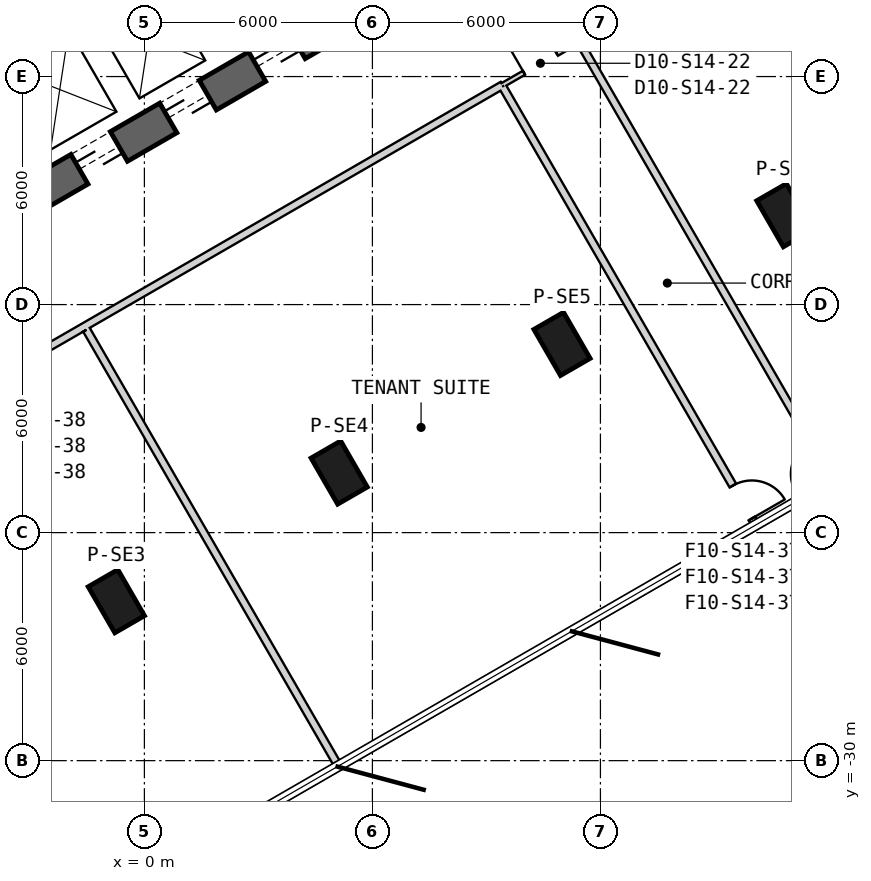
"""IFC4 building model, lengths in metres.
Left out: names, types, materials, properties, quantities, classifications, styles, units other than length and angle.
Written with IfcOpenShell. Run it as: python <this file> out.ifc"""

import sys

from ifc_helpers import new_model, si_unit, direction, frame, frame_2d, origin, origin_2d, place, context, subcontext, project, spatial, rectangle, extrude, element, fill, save


model = new_model("IFC4")
c1 = context("Model", 3, precision=1e-05, world=origin(), true_north=direction((0.0, 1.0)))
c2 = subcontext(c1, "Body", "Model", "MODEL_VIEW")
j1 = project(units=[si_unit("LENGTHUNIT", "METRE"), si_unit("PLANEANGLEUNIT", "RADIAN")], contexts=[c1])
p1 = place(None, origin())
s1 = spatial("IfcSite", under=j1, at=p1, CompositionType="ELEMENT")
p2 = place(p1, origin())
s2 = spatial("IfcBuilding", under=s1, at=p2, CompositionType="ELEMENT")
p3 = place(p2, frame((0.0, 0.0, 229.2)))
s3 = spatial("IfcBuildingStorey", under=s2, at=p3, CompositionType="ELEMENT", Elevation=229.2)
for number, where, z_axis, x_axis in (
    (1, (-0.738, -25.805, 0.0), (0.0, 0.0, 1.0), (0.5, -0.866, 0.0)),
    (2, (5.126, -22.42, 0.0), (0.0, 0.0, 1.0), (0.5, -0.866, 0.0)),
    (3, (10.99, -19.035, 0.0), (0.0, 0.0, 1.0), (0.5, -0.866, 0.0)),
    (4, (16.854, -15.649, 0.0), (0.0, 0.0, 1.0), (0.5, -0.866, 0.0)),
):
    element("IfcColumn", number, at=place(p3, frame(where, z_axis=z_axis, x_axis=x_axis)), inside=s3, PredefinedType="COLUMN", context=c2, shape_type="SweptSolid", body=[
        extrude(rectangle(XDim=1.4, YDim=0.9, at=origin_2d()), origin(), (0.0, 0.0, 1.0), 4.0),
    ])
p4 = place(p3, frame((-7.825, -17.97, 0.0), z_axis=(0.0, 0.0, 1.0), x_axis=(0.866028369851, 0.499994862586, 0.0)))
e5 = element("IfcWall", 5, at=p4, inside=s3, PredefinedType="SHEAR", context=c2, shape_type="SweptSolid", body=[
    extrude(rectangle(XDim=31.523, YDim=0.9, at=frame_2d((15.762, 0.0))), origin(), (0.0, 0.0, 1.0), 4.0),
])
p5 = place(p4, frame((7.062, 0.0, 0.0)))
e6 = element("IfcOpeningElement", 6, at=p5, cuts=e5, PredefinedType="OPENING", context=c2, shape_type="SweptSolid", body=[
    extrude(rectangle(XDim=1.2, YDim=2.4, at=frame_2d((0.6, 1.2))), frame((0.0, 0.46, 0.0), z_axis=(0.0, -1.0, 0.0), x_axis=(1.0, 0.0, 0.0)), (0.0, 0.0, 1.0), 0.92),
])
p6 = place(p4, frame((9.762, 0.0, 0.0)))
e7 = element("IfcOpeningElement", 7, at=p6, cuts=e5, PredefinedType="OPENING", context=c2, shape_type="SweptSolid", body=[
    extrude(rectangle(XDim=1.2, YDim=2.4, at=frame_2d((0.6, 1.2))), frame((0.0, 0.46, 0.0), z_axis=(0.0, -1.0, 0.0), x_axis=(1.0, 0.0, 0.0)), (0.0, 0.0, 1.0), 0.92),
])
p7 = place(p4, frame((12.462, 0.0, 0.0)))
e8 = element("IfcOpeningElement", 8, at=p7, cuts=e5, PredefinedType="OPENING", context=c2, shape_type="SweptSolid", body=[
    extrude(rectangle(XDim=1.2, YDim=2.4, at=frame_2d((0.6, 1.2))), frame((0.0, 0.46, 0.0), z_axis=(0.0, -1.0, 0.0), x_axis=(1.0, 0.0, 0.0)), (0.0, 0.0, 1.0), 0.92),
])
p8 = place(p4, frame((15.162, 0.0, 0.0)))
e9 = element("IfcOpeningElement", 9, at=p8, cuts=e5, PredefinedType="OPENING", context=c2, shape_type="SweptSolid", body=[
    extrude(rectangle(XDim=1.2, YDim=2.4, at=frame_2d((0.6, 1.2))), frame((0.0, 0.46, 0.0), z_axis=(0.0, -1.0, 0.0), x_axis=(1.0, 0.0, 0.0)), (0.0, 0.0, 1.0), 0.92),
])
p9 = place(p4, frame((17.862, 0.0, 0.0)))
e10 = element("IfcOpeningElement", 10, at=p9, cuts=e5, PredefinedType="OPENING", context=c2, shape_type="SweptSolid", body=[
    extrude(rectangle(XDim=1.2, YDim=2.4, at=frame_2d((0.6, 1.2))), frame((0.0, 0.46, 0.0), z_axis=(0.0, -1.0, 0.0), x_axis=(1.0, 0.0, 0.0)), (0.0, 0.0, 1.0), 0.92),
])
p10 = place(p4, frame((20.562, 0.0, 0.0)))
e11 = element("IfcOpeningElement", 11, at=p10, cuts=e5, PredefinedType="OPENING", context=c2, shape_type="SweptSolid", body=[
    extrude(rectangle(XDim=1.2, YDim=2.4, at=frame_2d((0.6, 1.2))), frame((0.0, 0.46, 0.0), z_axis=(0.0, -1.0, 0.0), x_axis=(1.0, 0.0, 0.0)), (0.0, 0.0, 1.0), 0.92),
])
p11 = place(p4, frame((26.712, 0.0, 0.0)))
e12 = element("IfcOpeningElement", 12, at=p11, cuts=e5, PredefinedType="OPENING", context=c2, shape_type="SweptSolid", body=[
    extrude(rectangle(XDim=1.2, YDim=2.4, at=frame_2d((0.6, 1.2))), frame((0.0, 0.46, 0.0), z_axis=(0.0, -1.0, 0.0), x_axis=(1.0, 0.0, 0.0)), (0.0, 0.0, 1.0), 0.92),
])
p12 = place(p4, frame((3.612, 0.0, 0.0)))
e13 = element("IfcOpeningElement", 13, at=p12, cuts=e5, PredefinedType="OPENING", context=c2, shape_type="SweptSolid", body=[
    extrude(rectangle(XDim=1.2, YDim=2.4, at=frame_2d((0.6, 1.2))), frame((0.0, 0.46, 0.0), z_axis=(0.0, -1.0, 0.0), x_axis=(1.0, 0.0, 0.0)), (0.0, 0.0, 1.0), 0.92),
])
p13 = place(p3, frame((-1.769, -10.237, 0.0), z_axis=(0.0, 0.0, 1.0), x_axis=(-0.871534483978, -0.490334215854, 0.0)))
e14 = element("IfcWall", 14, at=p13, inside=s3, PredefinedType="PLUMBINGWALL", context=c2, shape_type="SweptSolid", body=[
    extrude(rectangle(XDim=2.7, YDim=0.2, at=frame_2d((1.35, 0.0))), origin(), (0.0, 0.0, 1.0), 3.7),
])
p14 = place(p3, frame((9.425, -12.225, 0.0), z_axis=(0.0, 0.0, 1.0), x_axis=(0.866053019151, 0.499952165731, 0.0)))
e15 = element("IfcWall", 15, at=p14, inside=s3, PredefinedType="PARTITIONING", context=c2, shape_type="SweptSolid", body=[
    extrude(rectangle(XDim=2.3, YDim=0.12, at=frame_2d((1.15, 0.0))), origin(), (0.0, 0.0, 1.0), 3.7),
])
p15 = place(p14, frame((0.65, 0.0, 0.0)))
e16 = element("IfcOpeningElement", 16, at=p15, cuts=e15, PredefinedType="OPENING", context=c2, shape_type="SweptSolid", body=[
    extrude(rectangle(XDim=1.0, YDim=2.1, at=frame_2d((0.5, 1.05))), frame((0.0, 0.07, 0.0), z_axis=(0.0, -1.0, 0.0), x_axis=(1.0, 0.0, 0.0)), (0.0, 0.0, 1.0), 0.14),
])
p16 = place(p3, frame((-6.644, -21.503, 0.0), z_axis=(0.0, 0.0, 1.0), x_axis=(0.866020815794, 0.500007946548, 0.0)))
e17 = element("IfcWall", 17, at=p16, inside=s3, PredefinedType="PARTITIONING", context=c2, shape_type="SweptSolid", body=[
    extrude(rectangle(XDim=18.555, YDim=0.2, at=frame_2d((9.278, 0.0))), origin(), (0.0, 0.0, 1.0), 2.88),
])
p17 = place(p16, frame((2.477, 0.0, 0.0)))
e18 = element("IfcOpeningElement", 18, at=p17, cuts=e17, PredefinedType="OPENING", context=c2, shape_type="SweptSolid", body=[
    extrude(rectangle(XDim=1.0, YDim=2.1, at=frame_2d((0.5, 1.05))), frame((0.0, 0.11, 0.0), z_axis=(0.0, -1.0, 0.0), x_axis=(1.0, 0.0, 0.0)), (0.0, 0.0, 1.0), 0.22),
])
p18 = place(p3, frame((18.112, -22.631, 0.0), z_axis=(0.0, 0.0, 1.0), x_axis=(-0.499988448798, 0.866032072771, 0.0)))
e19 = element("IfcWall", 19, at=p18, inside=s3, PredefinedType="PARTITIONING", context=c2, shape_type="SweptSolid", body=[
    extrude(rectangle(XDim=13.295, YDim=0.2, at=frame_2d((6.647, 0.0))), origin(), (0.0, 0.0, 1.0), 3.7),
])
p19 = place(p18, frame((0.2, 0.0, 0.0)))
e20 = element("IfcOpeningElement", 20, at=p19, cuts=e19, PredefinedType="OPENING", context=c2, shape_type="SweptSolid", body=[
    extrude(rectangle(XDim=1.0, YDim=2.1, at=frame_2d((0.5, 1.05))), frame((0.0, 0.11, 0.0), z_axis=(0.0, -1.0, 0.0), x_axis=(1.0, 0.0, 0.0)), (0.0, 0.0, 1.0), 0.22),
])
p20 = place(p3, frame((9.438, -12.287, 0.0), z_axis=(0.0, 0.0, 1.0), x_axis=(0.499994270035, -0.866028711956, 0.0)))
e21 = element("IfcWall", 21, at=p20, inside=s3, PredefinedType="PARTITIONING", context=c2, shape_type="SweptSolid", body=[
    extrude(rectangle(XDim=13.295, YDim=0.2, at=frame_2d((6.647, 0.0))), origin(), (0.0, 0.0, 1.0), 3.7),
])
p21 = place(p20, frame((12.095, 0.0, 0.0)))
e22 = element("IfcOpeningElement", 22, at=p21, cuts=e21, PredefinedType="OPENING", context=c2, shape_type="SweptSolid", body=[
    extrude(rectangle(XDim=1.0, YDim=2.1, at=frame_2d((0.5, 1.05))), frame((0.0, 0.11, 0.0), z_axis=(0.0, -1.0, 0.0), x_axis=(1.0, 0.0, 0.0)), (0.0, 0.0, 1.0), 0.22),
])
p22 = place(p3, frame((5.104, -30.142, 0.0), z_axis=(0.0, 0.0, 1.0), x_axis=(-0.500068930226, 0.865985603242, 0.0)))
e23 = element("IfcWall", 23, at=p22, inside=s3, PredefinedType="PARTITIONING", context=c2, shape_type="SweptSolid", body=[
    extrude(rectangle(XDim=13.256, YDim=0.2, at=frame_2d((6.628, 0.0))), origin(), (0.0, 0.0, 1.0), 2.98),
])
p23 = place(p15, origin())
e24 = element("IfcDoor", 24, at=p23, inside=s3, OperationType="SINGLE_SWING_RIGHT", PredefinedType="NOTDEFINED", context=c2, shape_type="SweptSolid", body=[
    extrude(rectangle(XDim=1.0, YDim=2.1, at=frame_2d((0.5, 1.05))), frame((0.0, 0.025, 0.0), z_axis=(0.0, -1.0, 0.0), x_axis=(1.0, 0.0, 0.0)), (0.0, 0.0, 1.0), 0.05),
])
fill(e16, e24)
p24 = place(p21, origin())
e25 = element("IfcDoor", 25, at=p24, inside=s3, OperationType="SINGLE_SWING_LEFT", PredefinedType="USERDEFINED", context=c2, shape_type="SweptSolid", body=[
    extrude(rectangle(XDim=1.0, YDim=2.1, at=frame_2d((0.5, 1.05))), frame((0.0, 0.025, 0.0), z_axis=(0.0, -1.0, 0.0), x_axis=(1.0, 0.0, 0.0)), (0.0, 0.0, 1.0), 0.05),
])
fill(e22, e25)
p25 = place(p5, origin())
e26 = element("IfcDoor", 26, at=p25, inside=s3, OperationType="SLIDING_TO_LEFT", PredefinedType="USERDEFINED", context=c2, shape_type="SweptSolid", body=[
    extrude(rectangle(XDim=1.2, YDim=2.4, at=frame_2d((0.6, 1.2))), frame((0.0, 0.025, 0.0), z_axis=(0.0, -1.0, 0.0), x_axis=(1.0, 0.0, 0.0)), (0.0, 0.0, 1.0), 0.05),
])
fill(e6, e26)
p26 = place(p6, origin())
e27 = element("IfcDoor", 27, at=p26, inside=s3, OperationType="SLIDING_TO_LEFT", PredefinedType="USERDEFINED", context=c2, shape_type="SweptSolid", body=[
    extrude(rectangle(XDim=1.2, YDim=2.4, at=frame_2d((0.6, 1.2))), frame((0.0, 0.025, 0.0), z_axis=(0.0, -1.0, 0.0), x_axis=(1.0, 0.0, 0.0)), (0.0, 0.0, 1.0), 0.05),
])
fill(e7, e27)
p27 = place(p7, origin())
e28 = element("IfcDoor", 28, at=p27, inside=s3, OperationType="SLIDING_TO_LEFT", PredefinedType="USERDEFINED", context=c2, shape_type="SweptSolid", body=[
    extrude(rectangle(XDim=1.2, YDim=2.4, at=frame_2d((0.6, 1.2))), frame((0.0, 0.025, 0.0), z_axis=(0.0, -1.0, 0.0), x_axis=(1.0, 0.0, 0.0)), (0.0, 0.0, 1.0), 0.05),
])
fill(e8, e28)
save(model, sys.argv[1])
